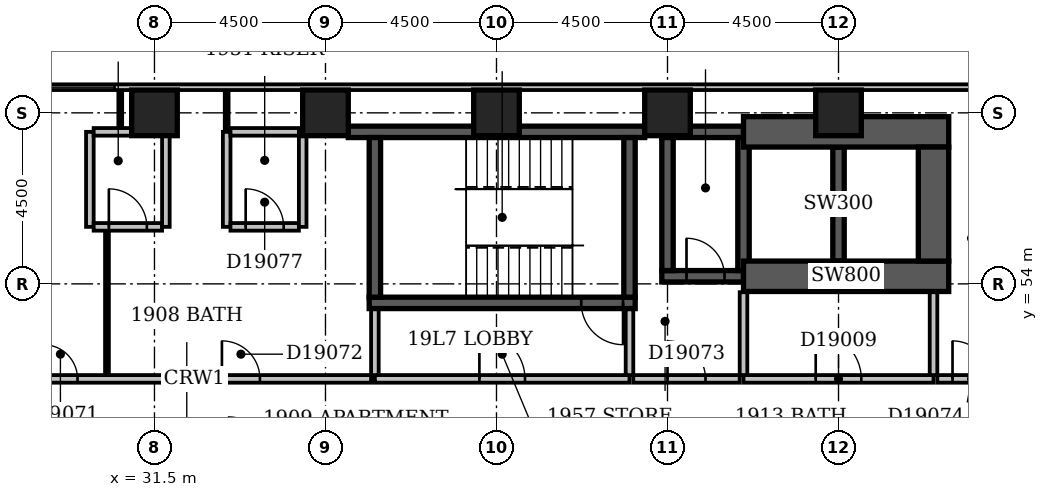
"""IFC4 building model, lengths in metres.
Left out: names, types, materials, properties, quantities, classifications, styles, units other than length and angle.
Written with IfcOpenShell. Run it as: python <this file> out.ifc"""

import sys

from ifc_helpers import new_model, si_unit, direction, frame, frame_2d, origin, origin_2d, place, context, subcontext, project, spatial, rectangle, extrude, element, fill, save


model = new_model("IFC4")
c1 = context("Model", 3, precision=1e-05, world=origin(), true_north=direction((0.0, 1.0)))
c2 = subcontext(c1, "Body", "Model", "MODEL_VIEW")
j1 = project(units=[si_unit("LENGTHUNIT", "METRE"), si_unit("PLANEANGLEUNIT", "RADIAN")], contexts=[c1])
p1 = place(None, origin())
s1 = spatial("IfcSite", under=j1, at=p1, CompositionType="ELEMENT")
p2 = place(p1, origin())
s2 = spatial("IfcBuilding", under=s1, at=p2, CompositionType="ELEMENT")
p3 = place(p2, frame((0.0, 0.0, 79.4)))
s3 = spatial("IfcBuildingStorey", under=s2, at=p3, CompositionType="ELEMENT", Elevation=79.4)
p4 = place(p3, frame((36.6, 58.0, -0.3), z_axis=(0.0, 0.0, 1.0), x_axis=(1.0, 0.0, 0.0)))
e1 = element("IfcWall", 1, at=p4, inside=s3, PredefinedType="SHEAR", context=c2, shape_type="SweptSolid", body=[
    extrude(rectangle(XDim=7.8, YDim=0.3, at=frame_2d((3.9, 0.0))), origin(), (0.0, 0.0, 1.0), 3.6),
])
p5 = place(p3, frame((37.15, 53.5, -0.3), z_axis=(0.0, 0.0, 1.0), x_axis=(1.0, 0.0, 0.0)))
e2 = element("IfcWall", 2, at=p5, inside=s3, PredefinedType="SHEAR", context=c2, shape_type="SweptSolid", body=[
    extrude(rectangle(XDim=7.0, YDim=0.3, at=frame_2d((3.5, 0.0))), origin(), (0.0, 0.0, 1.0), 3.6),
])
p6 = place(p5, frame((5.58, 0.0, 0.3)))
e3 = element("IfcOpeningElement", 3, at=p6, cuts=e2, PredefinedType="OPENING", context=c2, shape_type="SweptSolid", body=[
    extrude(rectangle(XDim=1.1, YDim=2.1, at=frame_2d((0.55, 1.05))), frame((0.0, 0.162, 0.0), z_axis=(0.0, -1.0, 0.0), x_axis=(1.0, 0.0, 0.0)), (0.0, 0.0, 1.0), 0.324),
])
for number, where, z_axis, x_axis in (
    (4, (37.3, 53.65, -0.3), (0.0, 0.0, 1.0), (0.0, 1.0, 0.0)),
    (5, (44.0, 53.65, -0.3), (0.0, 0.0, 1.0), (0.0, 1.0, 0.0)),
):
    element("IfcWall", number, at=place(p3, frame(where, z_axis=z_axis, x_axis=x_axis)), inside=s3, PredefinedType="SHEAR", context=c2, shape_type="SweptSolid", body=[
        extrude(rectangle(XDim=4.2, YDim=0.3, at=frame_2d((2.1, 0.0))), origin(), (0.0, 0.0, 1.0), 3.6),
    ])
p7 = place(p3, frame((44.85, 54.2, -0.3), z_axis=(0.0, 0.0, 1.0), x_axis=(1.0, 0.0, 0.0)))
e6 = element("IfcWall", 6, at=p7, inside=s3, PredefinedType="SHEAR", context=c2, shape_type="SweptSolid", body=[
    extrude(rectangle(XDim=2.15, YDim=0.3, at=frame_2d((1.075, 0.0))), origin(), (0.0, 0.0, 1.0), 3.6),
])
p8 = place(p7, frame((0.65, 0.0, 0.3)))
e7 = element("IfcOpeningElement", 7, at=p8, cuts=e6, PredefinedType="OPENING", context=c2, shape_type="SweptSolid", body=[
    extrude(rectangle(XDim=1.0, YDim=2.1, at=frame_2d((0.5, 1.05))), frame((0.0, 0.162, 0.0), z_axis=(0.0, -1.0, 0.0), x_axis=(1.0, 0.0, 0.0)), (0.0, 0.0, 1.0), 0.324),
])
p9 = place(p3, frame((44.85, 58.0, -0.3), z_axis=(0.0, 0.0, 1.0), x_axis=(1.0, 0.0, 0.0)))
e8 = element("IfcWall", 8, at=p9, inside=s3, PredefinedType="SHEAR", context=c2, shape_type="SweptSolid", body=[
    extrude(rectangle(XDim=2.15, YDim=0.3, at=frame_2d((1.075, 0.0))), origin(), (0.0, 0.0, 1.0), 3.6),
])
p10 = place(p3, frame((45.0, 54.35, -0.3), z_axis=(0.0, 0.0, 1.0), x_axis=(0.0, 1.0, 0.0)))
e9 = element("IfcWall", 9, at=p10, inside=s3, PredefinedType="SHEAR", context=c2, shape_type="SweptSolid", body=[
    extrude(rectangle(XDim=3.5, YDim=0.3, at=frame_2d((1.75, 0.0))), origin(), (0.0, 0.0, 1.0), 3.6),
])
p11 = place(p3, frame((47.0, 54.2, -0.3), z_axis=(0.0, 0.0, 1.0), x_axis=(1.0, 0.0, 0.0)))
e10 = element("IfcWall", 10, at=p11, inside=s3, PredefinedType="SHEAR", context=c2, shape_type="SweptSolid", body=[
    extrude(rectangle(XDim=5.4, YDim=0.8, at=frame_2d((2.7, 0.0))), origin(), (0.0, 0.0, 1.0), 3.6),
])
p12 = place(p3, frame((47.0, 54.35, -0.3), z_axis=(0.0, 0.0, 1.0), x_axis=(0.0, 1.0, 0.0)))
e11 = element("IfcWall", 11, at=p12, inside=s3, PredefinedType="SHEAR", context=c2, shape_type="SweptSolid", body=[
    extrude(rectangle(XDim=3.5, YDim=0.3, at=frame_2d((1.75, 0.0))), origin(), (0.0, 0.0, 1.0), 3.6),
])
p13 = place(p3, frame((47.0, 58.0, -0.3), z_axis=(0.0, 0.0, 1.0), x_axis=(1.0, 0.0, 0.0)))
e12 = element("IfcWall", 12, at=p13, inside=s3, PredefinedType="SHEAR", context=c2, shape_type="SweptSolid", body=[
    extrude(rectangle(XDim=5.4, YDim=0.8, at=frame_2d((2.7, 0.0))), origin(), (0.0, 0.0, 1.0), 3.6),
])
p14 = place(p3, frame((49.5, 54.6, -0.3), z_axis=(0.0, 0.0, 1.0), x_axis=(0.0, 1.0, 0.0)))
e13 = element("IfcWall", 13, at=p14, inside=s3, PredefinedType="SHEAR", context=c2, shape_type="SweptSolid", body=[
    extrude(rectangle(XDim=3.0, YDim=0.3, at=frame_2d((1.5, 0.0))), origin(), (0.0, 0.0, 1.0), 3.6),
])
p15 = place(p3, frame((52.0, 54.6, -0.3), z_axis=(0.0, 0.0, 1.0), x_axis=(0.0, 1.0, 0.0)))
e14 = element("IfcWall", 14, at=p15, inside=s3, PredefinedType="SHEAR", context=c2, shape_type="SweptSolid", body=[
    extrude(rectangle(XDim=3.0, YDim=0.8, at=frame_2d((1.5, 0.0))), origin(), (0.0, 0.0, 1.0), 3.6),
])
for number, where, z_axis, x_axis in (
    (15, (31.5, 58.5, -0.3), (0.0, 0.0, 1.0), (1.0, 0.0, 0.0)),
    (16, (36.0, 58.5, -0.3), (0.0, 0.0, 1.0), (1.0, 0.0, 0.0)),
    (17, (40.5, 58.5, -0.3), (0.0, 0.0, 1.0), (1.0, 0.0, 0.0)),
    (18, (45.0, 58.5, -0.3), (0.0, 0.0, 1.0), (1.0, 0.0, 0.0)),
    (19, (49.5, 58.5, -0.3), (0.0, 0.0, 1.0), (1.0, 0.0, 0.0)),
):
    element("IfcColumn", number, at=place(p3, frame(where, z_axis=z_axis, x_axis=x_axis)), inside=s3, PredefinedType="COLUMN", context=c2, shape_type="SweptSolid", body=[
        extrude(rectangle(XDim=1.2, YDim=1.2, at=origin_2d()), origin(), (0.0, 0.0, 1.0), 3.6),
    ])
p16 = place(p3, frame((68.1, 59.175, 0.0), z_axis=(0.0, 0.0, 1.0), x_axis=(-1.0, 0.0, 0.0)))
e20 = element("IfcWall", 20, at=p16, inside=s3, PredefinedType="STANDARD", context=c2, shape_type="SweptSolid", body=[
    extrude(rectangle(XDim=68.85, YDim=0.15, at=frame_2d((34.425, 0.0))), origin(), (0.0, 0.0, 1.0), 2.7),
])
p17 = place(p16, frame((1.65, 0.0, 0.6)))
e21 = element("IfcOpeningElement", 21, at=p17, cuts=e20, PredefinedType="OPENING", context=c2, shape_type="SweptSolid", body=[
    extrude(rectangle(XDim=2.4, YDim=1.8, at=frame_2d((1.2, 0.9))), frame((0.0, 0.087, 0.0), z_axis=(0.0, -1.0, 0.0), x_axis=(1.0, 0.0, 0.0)), (0.0, 0.0, 1.0), 0.174),
])
p18 = place(p16, frame((5.903, 0.0, 0.6)))
e22 = element("IfcOpeningElement", 22, at=p18, cuts=e20, PredefinedType="OPENING", context=c2, shape_type="SweptSolid", body=[
    extrude(rectangle(XDim=1.5, YDim=1.8, at=frame_2d((0.75, 0.9))), frame((0.0, 0.087, 0.0), z_axis=(0.0, -1.0, 0.0), x_axis=(1.0, 0.0, 0.0)), (0.0, 0.0, 1.0), 0.174),
])
p19 = place(p16, frame((37.65, 0.0, 0.6)))
e23 = element("IfcOpeningElement", 23, at=p19, cuts=e20, PredefinedType="OPENING", context=c2, shape_type="SweptSolid", body=[
    extrude(rectangle(XDim=2.4, YDim=1.8, at=frame_2d((1.2, 0.9))), frame((0.0, 0.087, 0.0), z_axis=(0.0, -1.0, 0.0), x_axis=(1.0, 0.0, 0.0)), (0.0, 0.0, 1.0), 0.174),
])
p20 = place(p3, frame((47.0, 51.5, 0.0), z_axis=(0.0, 0.0, 1.0), x_axis=(1.0, 0.0, 0.0)))
e24 = element("IfcWall", 24, at=p20, inside=s3, PredefinedType="PARTITIONING", context=c2, shape_type="SweptSolid", body=[
    extrude(rectangle(XDim=5.0, YDim=0.2, at=frame_2d((2.5, 0.0))), origin(), (0.0, 0.0, 1.0), 3.3),
])
p21 = place(p20, frame((1.9, 0.0, 0.0)))
e25 = element("IfcOpeningElement", 25, at=p21, cuts=e24, PredefinedType="OPENING", context=c2, shape_type="SweptSolid", body=[
    extrude(rectangle(XDim=1.2, YDim=2.1, at=frame_2d((0.6, 1.05))), frame((0.0, 0.112, 0.0), z_axis=(0.0, -1.0, 0.0), x_axis=(1.0, 0.0, 0.0)), (0.0, 0.0, 1.0), 0.224),
])
for number, where, z_axis, x_axis in (
    (26, (52.0, 51.6, 0.0), (0.0, 0.0, 1.0), (0.0, 1.0, 0.0)),
    (27, (47.0, 51.6, 0.0), (0.0, 0.0, 1.0), (0.0, 1.0, 0.0)),
):
    element("IfcWall", number, at=place(p3, frame(where, z_axis=z_axis, x_axis=x_axis)), inside=s3, PredefinedType="PARTITIONING", context=c2, shape_type="SweptSolid", body=[
        extrude(rectangle(XDim=2.18, YDim=0.2, at=frame_2d((1.09, 0.0))), origin(), (0.0, 0.0, 1.0), 3.3),
    ])
p22 = place(p3, frame((37.3, 51.5, 0.0), z_axis=(0.0, 0.0, 1.0), x_axis=(1.0, 0.0, 0.0)))
e28 = element("IfcWall", 28, at=p22, inside=s3, PredefinedType="PARTITIONING", context=c2, shape_type="SweptSolid", body=[
    extrude(rectangle(XDim=6.7, YDim=0.2, at=frame_2d((3.35, 0.0))), origin(), (0.0, 0.0, 1.0), 3.3),
])
p23 = place(p22, frame((2.75, 0.0, 0.0)))
e29 = element("IfcOpeningElement", 29, at=p23, cuts=e28, PredefinedType="OPENING", context=c2, shape_type="SweptSolid", body=[
    extrude(rectangle(XDim=1.2, YDim=2.1, at=frame_2d((0.6, 1.05))), frame((0.0, 0.112, 0.0), z_axis=(0.0, -1.0, 0.0), x_axis=(1.0, 0.0, 0.0)), (0.0, 0.0, 1.0), 0.224),
])
for number, where, z_axis, x_axis in (
    (30, (44.0, 51.6, 0.0), (0.0, 0.0, 1.0), (0.0, 1.0, 0.0)),
    (31, (37.3, 51.6, 0.0), (0.0, 0.0, 1.0), (0.0, 1.0, 0.0)),
):
    element("IfcWall", number, at=place(p3, frame(where, z_axis=z_axis, x_axis=x_axis)), inside=s3, PredefinedType="PARTITIONING", context=c2, shape_type="SweptSolid", body=[
        extrude(rectangle(XDim=1.73, YDim=0.2, at=frame_2d((0.865, 0.0))), origin(), (0.0, 0.0, 1.0), 3.3),
    ])
p24 = place(p3, frame((27.9, 51.5, 0.0), z_axis=(0.0, 0.0, 1.0), x_axis=(1.0, 0.0, 0.0)))
e32 = element("IfcWall", 32, at=p24, inside=s3, PredefinedType="PARTITIONING", context=c2, shape_type="SweptSolid", body=[
    extrude(rectangle(XDim=9.3, YDim=0.2, at=frame_2d((4.65, 0.0))), origin(), (0.0, 0.0, 1.0), 3.3),
])
p25 = place(p24, frame((0.675, 0.0, 0.0)))
e33 = element("IfcOpeningElement", 33, at=p25, cuts=e32, PredefinedType="OPENING", context=c2, shape_type="SweptSolid", body=[
    extrude(rectangle(XDim=0.9, YDim=2.1, at=frame_2d((0.45, 1.05))), frame((0.0, 0.112, 0.0), z_axis=(0.0, -1.0, 0.0), x_axis=(1.0, 0.0, 0.0)), (0.0, 0.0, 1.0), 0.224),
])
p26 = place(p24, frame((5.375, 0.0, 0.0)))
e34 = element("IfcOpeningElement", 34, at=p26, cuts=e32, PredefinedType="OPENING", context=c2, shape_type="SweptSolid", body=[
    extrude(rectangle(XDim=1.0, YDim=2.1, at=frame_2d((0.5, 1.05))), frame((0.0, 0.112, 0.0), z_axis=(0.0, -1.0, 0.0), x_axis=(1.0, 0.0, 0.0)), (0.0, 0.0, 1.0), 0.224),
])
p27 = place(p3, frame((44.1, 51.5, 0.0), z_axis=(0.0, 0.0, 1.0), x_axis=(1.0, 0.0, 0.0)))
e35 = element("IfcWall", 35, at=p27, inside=s3, PredefinedType="PARTITIONING", context=c2, shape_type="SweptSolid", body=[
    extrude(rectangle(XDim=2.8, YDim=0.2, at=frame_2d((1.4, 0.0))), origin(), (0.0, 0.0, 1.0), 3.3),
])
p28 = place(p27, frame((0.9, 0.0, 0.0)))
e36 = element("IfcOpeningElement", 36, at=p28, cuts=e35, PredefinedType="OPENING", context=c2, shape_type="SweptSolid", body=[
    extrude(rectangle(XDim=1.0, YDim=2.1, at=frame_2d((0.5, 1.05))), frame((0.0, 0.112, 0.0), z_axis=(0.0, -1.0, 0.0), x_axis=(1.0, 0.0, 0.0)), (0.0, 0.0, 1.0), 0.224),
])
p29 = place(p3, frame((52.1, 51.5, 0.0), z_axis=(0.0, 0.0, 1.0), x_axis=(1.0, 0.0, 0.0)))
e37 = element("IfcWall", 37, at=p29, inside=s3, PredefinedType="PARTITIONING", context=c2, shape_type="SweptSolid", body=[
    extrude(rectangle(XDim=1.8, YDim=0.2, at=frame_2d((0.9, 0.0))), origin(), (0.0, 0.0, 1.0), 3.3),
])
p30 = place(p29, frame((0.4, 0.0, 0.0)))
e38 = element("IfcOpeningElement", 38, at=p30, cuts=e37, PredefinedType="OPENING", context=c2, shape_type="SweptSolid", body=[
    extrude(rectangle(XDim=1.0, YDim=2.1, at=frame_2d((0.5, 1.05))), frame((0.0, 0.112, 0.0), z_axis=(0.0, -1.0, 0.0), x_axis=(1.0, 0.0, 0.0)), (0.0, 0.0, 1.0), 0.224),
])
p31 = place(p3, frame((30.25, 51.6, 0.0), z_axis=(0.0, 0.0, 1.0), x_axis=(0.0, 1.0, 0.0)))
e39 = element("IfcWall", 39, at=p31, inside=s3, PredefinedType="PARTITIONING", context=c2, shape_type="SweptSolid", body=[
    extrude(rectangle(XDim=3.8, YDim=0.1, at=frame_2d((1.9, 0.0))), origin(), (0.0, 0.0, 1.0), 3.3),
])
p32 = place(p3, frame((29.8, 55.5, 0.0), z_axis=(0.0, 0.0, 1.0), x_axis=(0.0, 1.0, 0.0)))
e40 = element("IfcWall", 40, at=p32, inside=s3, PredefinedType="PARTITIONING", context=c2, shape_type="SweptSolid", body=[
    extrude(rectangle(XDim=2.5, YDim=0.2, at=frame_2d((1.25, 0.0))), origin(), (0.0, 0.0, 1.0), 3.3),
])
p33 = place(p3, frame((29.9, 55.5, 0.0), z_axis=(0.0, 0.0, 1.0), x_axis=(1.0, 0.0, 0.0)))
e41 = element("IfcWall", 41, at=p33, inside=s3, PredefinedType="PARTITIONING", context=c2, shape_type="SweptSolid", body=[
    extrude(rectangle(XDim=1.8, YDim=0.2, at=frame_2d((0.9, 0.0))), origin(), (0.0, 0.0, 1.0), 3.3),
])
p34 = place(p33, frame((0.4, 0.0, 0.0)))
e42 = element("IfcOpeningElement", 42, at=p34, cuts=e41, PredefinedType="OPENING", context=c2, shape_type="SweptSolid", body=[
    extrude(rectangle(XDim=1.0, YDim=2.1, at=frame_2d((0.5, 1.05))), frame((0.0, 0.112, 0.0), z_axis=(0.0, -1.0, 0.0), x_axis=(1.0, 0.0, 0.0)), (0.0, 0.0, 1.0), 0.224),
])
for number, where, z_axis, x_axis in (
    (43, (31.8, 55.5, 0.0), (0.0, 0.0, 1.0), (0.0, 1.0, 0.0)),
    (44, (33.4, 55.5, 0.0), (0.0, 0.0, 1.0), (0.0, 1.0, 0.0)),
):
    element("IfcWall", number, at=place(p3, frame(where, z_axis=z_axis, x_axis=x_axis)), inside=s3, PredefinedType="PARTITIONING", context=c2, shape_type="SweptSolid", body=[
        extrude(rectangle(XDim=2.5, YDim=0.2, at=frame_2d((1.25, 0.0))), origin(), (0.0, 0.0, 1.0), 3.3),
    ])
p35 = place(p3, frame((33.5, 55.5, 0.0), z_axis=(0.0, 0.0, 1.0), x_axis=(1.0, 0.0, 0.0)))
e45 = element("IfcWall", 45, at=p35, inside=s3, PredefinedType="PARTITIONING", context=c2, shape_type="SweptSolid", body=[
    extrude(rectangle(XDim=1.8, YDim=0.2, at=frame_2d((0.9, 0.0))), origin(), (0.0, 0.0, 1.0), 3.3),
])
p36 = place(p35, frame((0.4, 0.0, 0.0)))
e46 = element("IfcOpeningElement", 46, at=p36, cuts=e45, PredefinedType="OPENING", context=c2, shape_type="SweptSolid", body=[
    extrude(rectangle(XDim=1.0, YDim=2.1, at=frame_2d((0.5, 1.05))), frame((0.0, 0.112, 0.0), z_axis=(0.0, -1.0, 0.0), x_axis=(1.0, 0.0, 0.0)), (0.0, 0.0, 1.0), 0.224),
])
p37 = place(p3, frame((35.4, 55.5, 0.0), z_axis=(0.0, 0.0, 1.0), x_axis=(0.0, 1.0, 0.0)))
e47 = element("IfcWall", 47, at=p37, inside=s3, PredefinedType="PARTITIONING", context=c2, shape_type="SweptSolid", body=[
    extrude(rectangle(XDim=2.5, YDim=0.2, at=frame_2d((1.25, 0.0))), origin(), (0.0, 0.0, 1.0), 2.4),
])
p38 = place(p3, frame((29.9, 58.0, 0.0), z_axis=(0.0, 0.0, 1.0), x_axis=(1.0, 0.0, 0.0)))
e48 = element("IfcWall", 48, at=p38, inside=s3, PredefinedType="PARTITIONING", context=c2, shape_type="SweptSolid", body=[
    extrude(rectangle(XDim=1.8, YDim=0.2, at=frame_2d((0.9, 0.0))), origin(), (0.0, 0.0, 1.0), 3.3),
])
p39 = place(p3, frame((33.4, 58.0, 0.0), z_axis=(0.0, 0.0, 1.0), x_axis=(0.0, 1.0, 0.0)))
e49 = element("IfcWall", 49, at=p39, inside=s3, PredefinedType="PARTITIONING", context=c2, shape_type="SweptSolid", body=[
    extrude(rectangle(XDim=1.1, YDim=0.1, at=frame_2d((0.55, 0.0))), origin(), (0.0, 0.0, 1.0), 3.3),
])
p40 = place(p3, frame((33.5, 58.0, 0.0), z_axis=(0.0, 0.0, 1.0), x_axis=(1.0, 0.0, 0.0)))
e50 = element("IfcWall", 50, at=p40, inside=s3, PredefinedType="PARTITIONING", context=c2, shape_type="SweptSolid", body=[
    extrude(rectangle(XDim=1.8, YDim=0.2, at=frame_2d((0.9, 0.0))), origin(), (0.0, 0.0, 1.0), 3.3),
])
p41 = place(p3, frame((30.6, 58.1, 0.0), z_axis=(0.0, 0.0, 1.0), x_axis=(0.0, 1.0, 0.0)))
e51 = element("IfcWall", 51, at=p41, inside=s3, PredefinedType="PARTITIONING", context=c2, shape_type="SweptSolid", body=[
    extrude(rectangle(XDim=1.0, YDim=0.1, at=frame_2d((0.5, 0.0))), origin(), (0.0, 0.0, 1.0), 3.3),
])
p42 = place(p19, origin())
e52 = element("IfcWindow", 52, at=p42, inside=s3, PartitioningType="SINGLE_PANEL", PredefinedType="WINDOW", context=c2, shape_type="SweptSolid", body=[
    extrude(rectangle(XDim=2.4, YDim=1.8, at=frame_2d((1.2, 0.9))), frame((0.0, 0.03, 0.0), z_axis=(0.0, -1.0, 0.0), x_axis=(1.0, 0.0, 0.0)), (0.0, 0.0, 1.0), 0.06),
])
fill(e23, e52)
p43 = place(p23, origin())
e53 = element("IfcDoor", 53, at=p43, inside=s3, OperationType="SINGLE_SWING_LEFT", PredefinedType="DOOR", context=c2, shape_type="SweptSolid", body=[
    extrude(rectangle(XDim=1.2, YDim=2.1, at=frame_2d((0.6, 1.05))), frame((0.0, 0.025, 0.0), z_axis=(0.0, -1.0, 0.0), x_axis=(1.0, 0.0, 0.0)), (0.0, 0.0, 1.0), 0.05),
])
fill(e29, e53)
p44 = place(p21, origin())
e54 = element("IfcDoor", 54, at=p44, inside=s3, OperationType="SINGLE_SWING_LEFT", PredefinedType="DOOR", context=c2, shape_type="SweptSolid", body=[
    extrude(rectangle(XDim=1.2, YDim=2.1, at=frame_2d((0.6, 1.05))), frame((0.0, 0.025, 0.0), z_axis=(0.0, -1.0, 0.0), x_axis=(1.0, 0.0, 0.0)), (0.0, 0.0, 1.0), 0.05),
])
fill(e25, e54)
p45 = place(p8, origin())
e55 = element("IfcDoor", 55, at=p45, inside=s3, OperationType="SINGLE_SWING_LEFT", PredefinedType="DOOR", context=c2, shape_type="SweptSolid", body=[
    extrude(rectangle(XDim=1.0, YDim=2.1, at=frame_2d((0.5, 1.05))), frame((0.0, 0.025, 0.0), z_axis=(0.0, -1.0, 0.0), x_axis=(1.0, 0.0, 0.0)), (0.0, 0.0, 1.0), 0.05),
])
fill(e7, e55)
p46 = place(p6, origin())
e56 = element("IfcDoor", 56, at=p46, inside=s3, OperationType="SINGLE_SWING_RIGHT", PredefinedType="DOOR", context=c2, shape_type="SweptSolid", body=[
    extrude(rectangle(XDim=1.1, YDim=2.1, at=frame_2d((0.55, 1.05))), frame((0.0, 0.025, 0.0), z_axis=(0.0, -1.0, 0.0), x_axis=(1.0, 0.0, 0.0)), (0.0, 0.0, 1.0), 0.05),
])
fill(e3, e56)
p47 = place(p25, origin())
e57 = element("IfcDoor", 57, at=p47, inside=s3, OperationType="SINGLE_SWING_LEFT", PredefinedType="DOOR", context=c2, shape_type="SweptSolid", body=[
    extrude(rectangle(XDim=0.9, YDim=2.1, at=frame_2d((0.45, 1.05))), frame((0.0, 0.025, 0.0), z_axis=(0.0, -1.0, 0.0), x_axis=(1.0, 0.0, 0.0)), (0.0, 0.0, 1.0), 0.05),
])
fill(e33, e57)
p48 = place(p26, origin())
e58 = element("IfcDoor", 58, at=p48, inside=s3, OperationType="SINGLE_SWING_LEFT", PredefinedType="DOOR", context=c2, shape_type="SweptSolid", body=[
    extrude(rectangle(XDim=1.0, YDim=2.1, at=frame_2d((0.5, 1.05))), frame((0.0, 0.025, 0.0), z_axis=(0.0, -1.0, 0.0), x_axis=(1.0, 0.0, 0.0)), (0.0, 0.0, 1.0), 0.05),
])
fill(e34, e58)
p49 = place(p28, origin())
e59 = element("IfcDoor", 59, at=p49, inside=s3, OperationType="SINGLE_SWING_LEFT", PredefinedType="DOOR", context=c2, shape_type="SweptSolid", body=[
    extrude(rectangle(XDim=1.0, YDim=2.1, at=frame_2d((0.5, 1.05))), frame((0.0, 0.025, 0.0), z_axis=(0.0, -1.0, 0.0), x_axis=(1.0, 0.0, 0.0)), (0.0, 0.0, 1.0), 0.05),
])
fill(e36, e59)
p50 = place(p30, origin())
e60 = element("IfcDoor", 60, at=p50, inside=s3, OperationType="SINGLE_SWING_LEFT", PredefinedType="DOOR", context=c2, shape_type="SweptSolid", body=[
    extrude(rectangle(XDim=1.0, YDim=2.1, at=frame_2d((0.5, 1.05))), frame((0.0, 0.025, 0.0), z_axis=(0.0, -1.0, 0.0), x_axis=(1.0, 0.0, 0.0)), (0.0, 0.0, 1.0), 0.05),
])
fill(e38, e60)
p51 = place(p34, origin())
e61 = element("IfcDoor", 61, at=p51, inside=s3, OperationType="SINGLE_SWING_LEFT", PredefinedType="DOOR", context=c2, shape_type="SweptSolid", body=[
    extrude(rectangle(XDim=1.0, YDim=2.1, at=frame_2d((0.5, 1.05))), frame((0.0, 0.025, 0.0), z_axis=(0.0, -1.0, 0.0), x_axis=(1.0, 0.0, 0.0)), (0.0, 0.0, 1.0), 0.05),
])
fill(e42, e61)
p52 = place(p36, origin())
e62 = element("IfcDoor", 62, at=p52, inside=s3, OperationType="SINGLE_SWING_LEFT", PredefinedType="DOOR", context=c2, shape_type="SweptSolid", body=[
    extrude(rectangle(XDim=1.0, YDim=2.1, at=frame_2d((0.5, 1.05))), frame((0.0, 0.025, 0.0), z_axis=(0.0, -1.0, 0.0), x_axis=(1.0, 0.0, 0.0)), (0.0, 0.0, 1.0), 0.05),
])
fill(e46, e62)
save(model, sys.argv[1])
